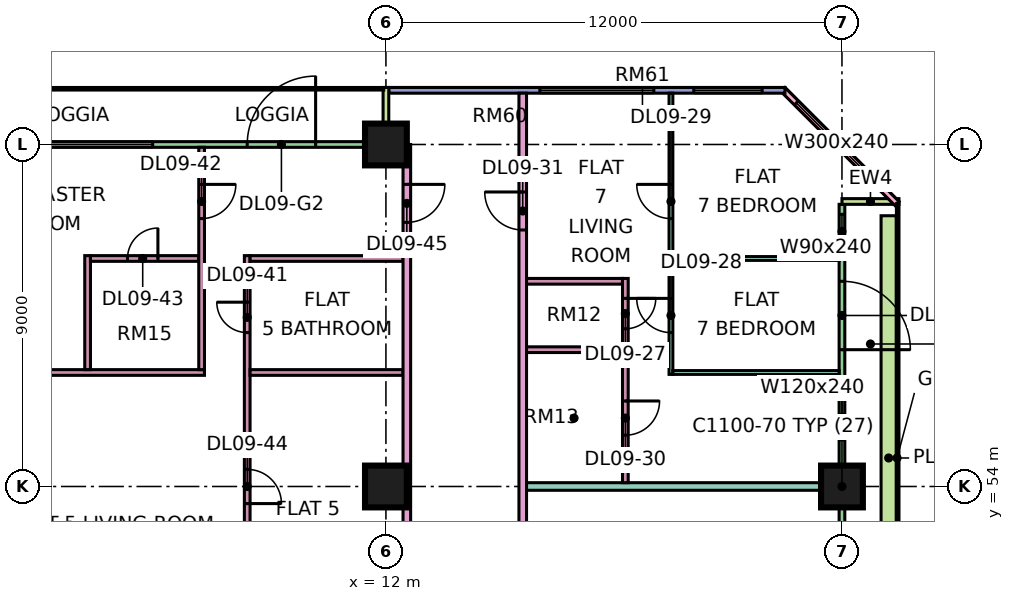
"""IFC4 building model, lengths in metres.
Left out: names, types, materials, properties, quantities, classifications, styles, units other than length and angle.
Written with IfcOpenShell. Run it as: python <this file> out.ifc"""

import sys

from ifc_helpers import new_model, si_unit, direction, frame, frame_2d, origin, origin_2d, place, context, subcontext, project, spatial, rectangle, extrude, element, fill, save


model = new_model("IFC4")
c1 = context("Model", 3, precision=1e-05, world=origin(), true_north=direction((0.0, 1.0)))
c2 = subcontext(c1, "Body", "Model", "MODEL_VIEW")
j1 = project(units=[si_unit("LENGTHUNIT", "METRE"), si_unit("PLANEANGLEUNIT", "RADIAN")], contexts=[c1])
p1 = place(None, origin())
s1 = spatial("IfcSite", under=j1, at=p1, CompositionType="ELEMENT")
p2 = place(p1, origin())
s2 = spatial("IfcBuilding", under=s1, at=p2, CompositionType="ELEMENT")
p3 = place(p2, frame((0.0, 0.0, 48.9)))
s3 = spatial("IfcBuildingStorey", under=s2, at=p3, CompositionType="ELEMENT", Elevation=48.9)
for number, where, z_axis, x_axis in (
    (1, (12.0, 54.0, 0.0), (0.0, 0.0, 1.0), (1.0, 0.0, 0.0)),
    (2, (12.0, 63.0, 0.0), (0.0, 0.0, 1.0), (1.0, 0.0, 0.0)),
    (3, (24.0, 54.0, 0.0), (0.0, 0.0, 1.0), (1.0, 0.0, 0.0)),
):
    element("IfcColumn", number, at=place(p3, frame(where, z_axis=z_axis, x_axis=x_axis)), inside=s3, PredefinedType="COLUMN", context=c2, shape_type="SweptSolid", body=[
        extrude(rectangle(XDim=1.1, YDim=1.1, at=origin_2d()), origin(), (0.0, 0.0, 1.0), 3.75),
    ])
p4 = place(p3, frame((24.0, 48.075, 0.0), z_axis=(0.0, 0.0, 1.0), x_axis=(0.0, 1.0, 0.0)))
e4 = element("IfcWall", 4, at=p4, inside=s3, PredefinedType="SOLIDWALL", context=c2, shape_type="SweptSolid", body=[
    extrude(rectangle(XDim=13.35, YDim=0.15, at=frame_2d((6.675, 0.0))), origin(), (0.0, 0.0, 1.0), 3.35),
])
p5 = place(p4, frame((0.538, 0.0, 0.45)))
e5 = element("IfcOpeningElement", 5, at=p5, cuts=e4, PredefinedType="OPENING", context=c2, shape_type="SweptSolid", body=[
    extrude(rectangle(XDim=4.2, YDim=2.4, at=frame_2d((2.1, 1.2))), frame((0.0, 0.085, 0.0), z_axis=(0.0, -1.0, 0.0), x_axis=(1.0, 0.0, 0.0)), (0.0, 0.0, 1.0), 0.17),
])
p6 = place(p4, frame((7.15, 0.0, 0.45)))
e6 = element("IfcOpeningElement", 6, at=p6, cuts=e4, PredefinedType="OPENING", context=c2, shape_type="SweptSolid", body=[
    extrude(rectangle(XDim=1.2, YDim=2.4, at=frame_2d((0.6, 1.2))), frame((0.0, 0.085, 0.0), z_axis=(0.0, -1.0, 0.0), x_axis=(1.0, 0.0, 0.0)), (0.0, 0.0, 1.0), 0.17),
])
p7 = place(p4, frame((9.525, 0.0, 0.0)))
e7 = element("IfcOpeningElement", 7, at=p7, cuts=e4, PredefinedType="OPENING", context=c2, shape_type="SweptSolid", body=[
    extrude(rectangle(XDim=1.8, YDim=2.4, at=frame_2d((0.9, 1.2))), frame((0.0, 0.085, 0.0), z_axis=(0.0, -1.0, 0.0), x_axis=(1.0, 0.0, 0.0)), (0.0, 0.0, 1.0), 0.17),
])
p8 = place(p4, frame((12.188, 0.0, 0.45)))
e8 = element("IfcOpeningElement", 8, at=p8, cuts=e4, PredefinedType="OPENING", context=c2, shape_type="SweptSolid", body=[
    extrude(rectangle(XDim=0.9, YDim=2.4, at=frame_2d((0.45, 1.2))), frame((0.0, 0.085, 0.0), z_axis=(0.0, -1.0, 0.0), x_axis=(1.0, 0.0, 0.0)), (0.0, 0.0, 1.0), 0.17),
])
p9 = place(p3, frame((25.5, 61.5, 0.0), z_axis=(0.0, 0.0, 1.0), x_axis=(-1.0, 0.0, 0.0)))
e9 = element("IfcWall", 9, at=p9, inside=s3, PredefinedType="SOLIDWALL", context=c2, shape_type="SweptSolid", body=[
    extrude(rectangle(XDim=1.5, YDim=0.15, at=frame_2d((0.75, 0.0))), origin(), (0.0, 0.0, 1.0), 3.35),
])
p10 = place(p3, frame((25.447, 61.447, 0.0), z_axis=(0.0, 0.0, 1.0), x_axis=(-0.707106781187, 0.707106781187, 0.0)))
e10 = element("IfcWall", 10, at=p10, inside=s3, PredefinedType="SOLIDWALL", context=c2, shape_type="SweptSolid", body=[
    extrude(rectangle(XDim=4.243, YDim=0.15, at=frame_2d((2.121, 0.0))), origin(), (0.0, 0.0, 1.0), 3.35),
])
p11 = place(p10, frame((0.744, 0.0, 0.45)))
e11 = element("IfcOpeningElement", 11, at=p11, cuts=e10, PredefinedType="OPENING", context=c2, shape_type="SweptSolid", body=[
    extrude(rectangle(XDim=3.0, YDim=2.4, at=frame_2d((1.5, 1.2))), frame((0.0, 0.085, 0.0), z_axis=(0.0, -1.0, 0.0), x_axis=(1.0, 0.0, 0.0)), (0.0, 0.0, 1.0), 0.17),
])
p12 = place(p3, frame((22.5, 64.425, 0.0), z_axis=(0.0, 0.0, 1.0), x_axis=(-1.0, 0.0, 0.0)))
e12 = element("IfcWall", 12, at=p12, inside=s3, PredefinedType="SOLIDWALL", context=c2, shape_type="SweptSolid", body=[
    extrude(rectangle(XDim=10.425, YDim=0.15, at=frame_2d((5.212, 0.0))), origin(), (0.0, 0.0, 1.0), 3.35),
])
p13 = place(p12, frame((0.6, 0.0, 0.45)))
e13 = element("IfcOpeningElement", 13, at=p13, cuts=e12, PredefinedType="OPENING", context=c2, shape_type="SweptSolid", body=[
    extrude(rectangle(XDim=1.8, YDim=2.4, at=frame_2d((0.9, 1.2))), frame((0.0, 0.085, 0.0), z_axis=(0.0, -1.0, 0.0), x_axis=(1.0, 0.0, 0.0)), (0.0, 0.0, 1.0), 0.17),
])
p14 = place(p12, frame((3.45, 0.0, 0.45)))
e14 = element("IfcOpeningElement", 14, at=p14, cuts=e12, PredefinedType="OPENING", context=c2, shape_type="SweptSolid", body=[
    extrude(rectangle(XDim=3.0, YDim=2.4, at=frame_2d((1.5, 1.2))), frame((0.0, 0.085, 0.0), z_axis=(0.0, -1.0, 0.0), x_axis=(1.0, 0.0, 0.0)), (0.0, 0.0, 1.0), 0.17),
])
p15 = place(p3, frame((11.925, 63.0, 0.0), z_axis=(0.0, 0.0, 1.0), x_axis=(-1.0, 0.0, 0.0)))
e15 = element("IfcWall", 15, at=p15, inside=s3, PredefinedType="SOLIDWALL", context=c2, shape_type="SweptSolid", body=[
    extrude(rectangle(XDim=10.35, YDim=0.15, at=frame_2d((5.175, 0.0))), origin(), (0.0, 0.0, 1.0), 3.35),
])
p16 = place(p15, frame((1.775, 0.0, 0.0)))
e16 = element("IfcOpeningElement", 16, at=p16, cuts=e15, PredefinedType="OPENING", context=c2, shape_type="SweptSolid", body=[
    extrude(rectangle(XDim=1.8, YDim=2.4, at=frame_2d((0.9, 1.2))), frame((0.0, 0.085, 0.0), z_axis=(0.0, -1.0, 0.0), x_axis=(1.0, 0.0, 0.0)), (0.0, 0.0, 1.0), 0.17),
])
p17 = place(p15, frame((6.062, 0.0, 0.45)))
e17 = element("IfcOpeningElement", 17, at=p17, cuts=e15, PredefinedType="OPENING", context=c2, shape_type="SweptSolid", body=[
    extrude(rectangle(XDim=3.0, YDim=2.4, at=frame_2d((1.5, 1.2))), frame((0.0, 0.085, 0.0), z_axis=(0.0, -1.0, 0.0), x_axis=(1.0, 0.0, 0.0)), (0.0, 0.0, 1.0), 0.17),
])
p18 = place(p3, frame((12.0, 64.5, 0.0), z_axis=(0.0, 0.0, 1.0), x_axis=(0.0, -1.0, 0.0)))
e18 = element("IfcWall", 18, at=p18, inside=s3, PredefinedType="SOLIDWALL", context=c2, shape_type="SweptSolid", body=[
    extrude(rectangle(XDim=1.5, YDim=0.15, at=frame_2d((0.75, 0.0))), origin(), (0.0, 0.0, 1.0), 3.35),
])
p19 = place(p3, frame((25.229, 48.375, 0.0), z_axis=(0.0, 0.0, 1.0), x_axis=(0.0, 1.0, 0.0)))
e19 = element("IfcWall", 19, at=p19, inside=s3, PredefinedType="SOLIDWALL", context=c2, shape_type="SweptSolid", body=[
    extrude(rectangle(XDim=12.75, YDim=0.4, at=frame_2d((6.375, 0.0))), origin(), (0.0, 0.0, 1.0), 0.7),
])
p20 = place(p3, frame((0.074, 57.0, 0.0), z_axis=(0.0, 0.0, 1.0), x_axis=(1.0, 0.0, 0.0)))
e20 = element("IfcWall", 20, at=p20, inside=s3, PredefinedType="PARTITIONING", context=c2, shape_type="SweptSolid", body=[
    extrude(rectangle(XDim=7.151, YDim=0.15, at=frame_2d((3.576, 0.0))), origin(), (0.0, 0.0, 1.0), 3.35),
])
p21 = place(p3, frame((4.15, 57.075, 0.0), z_axis=(0.0, 0.0, 1.0), x_axis=(0.0, 1.0, 0.0)))
e21 = element("IfcWall", 21, at=p21, inside=s3, PredefinedType="PARTITIONING", context=c2, shape_type="SweptSolid", body=[
    extrude(rectangle(XDim=3.0, YDim=0.15, at=frame_2d((1.5, 0.0))), origin(), (0.0, 0.0, 1.0), 3.35),
])
p22 = place(p3, frame((4.225, 60.0, 0.0), z_axis=(0.0, 0.0, 1.0), x_axis=(1.0, 0.0, 0.0)))
e22 = element("IfcWall", 22, at=p22, inside=s3, PredefinedType="PARTITIONING", context=c2, shape_type="SweptSolid", body=[
    extrude(rectangle(XDim=2.85, YDim=0.15, at=frame_2d((1.425, 0.0))), origin(), (0.0, 0.0, 1.0), 3.35),
])
p23 = place(p22, frame((0.975, 0.0, 0.0)))
e23 = element("IfcOpeningElement", 23, at=p23, cuts=e22, PredefinedType="OPENING", context=c2, shape_type="SweptSolid", body=[
    extrude(rectangle(XDim=0.8, YDim=2.1, at=frame_2d((0.4, 1.05))), frame((0.0, 0.085, 0.0), z_axis=(0.0, -1.0, 0.0), x_axis=(1.0, 0.0, 0.0)), (0.0, 0.0, 1.0), 0.17),
])
p24 = place(p3, frame((7.15, 57.075, 0.0), z_axis=(0.0, 0.0, 1.0), x_axis=(0.0, 1.0, 0.0)))
e24 = element("IfcWall", 24, at=p24, inside=s3, PredefinedType="PARTITIONING", context=c2, shape_type="SweptSolid", body=[
    extrude(rectangle(XDim=5.851, YDim=0.15, at=frame_2d((2.926, 0.0))), origin(), (0.0, 0.0, 1.0), 3.35),
])
p25 = place(p24, frame((3.975, 0.0, 0.0)))
e25 = element("IfcOpeningElement", 25, at=p25, cuts=e24, PredefinedType="OPENING", context=c2, shape_type="SweptSolid", body=[
    extrude(rectangle(XDim=0.9, YDim=2.1, at=frame_2d((0.45, 1.05))), frame((0.0, 0.085, 0.0), z_axis=(0.0, -1.0, 0.0), x_axis=(1.0, 0.0, 0.0)), (0.0, 0.0, 1.0), 0.17),
])
p26 = place(p3, frame((8.35, 51.1, 0.0), z_axis=(0.0, 0.0, 1.0), x_axis=(0.0, 1.0, 0.0)))
e26 = element("IfcWall", 26, at=p26, inside=s3, PredefinedType="PARTITIONING", context=c2, shape_type="SweptSolid", body=[
    extrude(rectangle(XDim=8.975, YDim=0.15, at=frame_2d((4.487, 0.0))), origin(), (0.0, 0.0, 1.0), 3.35),
])
p27 = place(p26, frame((6.95, 0.0, 0.0)))
e27 = element("IfcOpeningElement", 27, at=p27, cuts=e26, PredefinedType="OPENING", context=c2, shape_type="SweptSolid", body=[
    extrude(rectangle(XDim=0.8, YDim=2.1, at=frame_2d((0.4, 1.05))), frame((0.0, 0.085, 0.0), z_axis=(0.0, -1.0, 0.0), x_axis=(1.0, 0.0, 0.0)), (0.0, 0.0, 1.0), 0.17),
])
p28 = place(p26, frame((2.45, 0.0, 0.0)))
e28 = element("IfcOpeningElement", 28, at=p28, cuts=e26, PredefinedType="OPENING", context=c2, shape_type="SweptSolid", body=[
    extrude(rectangle(XDim=0.9, YDim=2.1, at=frame_2d((0.45, 1.05))), frame((0.0, 0.085, 0.0), z_axis=(0.0, -1.0, 0.0), x_axis=(1.0, 0.0, 0.0)), (0.0, 0.0, 1.0), 0.17),
])
for number, where, z_axis, x_axis in (
    (29, (8.425, 57.0, 0.0), (0.0, 0.0, 1.0), (1.0, 0.0, 0.0)),
    (30, (8.425, 60.0, 0.0), (0.0, 0.0, 1.0), (1.0, 0.0, 0.0)),
):
    element("IfcWall", number, at=place(p3, frame(where, z_axis=z_axis, x_axis=x_axis)), inside=s3, PredefinedType="PARTITIONING", context=c2, shape_type="SweptSolid", body=[
        extrude(rectangle(XDim=4.025, YDim=0.15, at=frame_2d((2.012, 0.0))), origin(), (0.0, 0.0, 1.0), 3.35),
    ])
p29 = place(p3, frame((12.55, 39.225, 0.0), z_axis=(0.0, 0.0, 1.0), x_axis=(0.0, 1.0, 0.0)))
e31 = element("IfcWall", 31, at=p29, inside=s3, PredefinedType="PARTITIONING", context=c2, shape_type="SweptSolid", body=[
    extrude(rectangle(XDim=23.775, YDim=0.2, at=frame_2d((11.887, 0.0))), origin(), (0.0, 0.0, 1.0), 3.35),
])
p30 = place(p29, frame((3.725, 0.0, 0.0)))
e32 = element("IfcOpeningElement", 32, at=p30, cuts=e31, PredefinedType="OPENING", context=c2, shape_type="SweptSolid", body=[
    extrude(rectangle(XDim=1.0, YDim=2.1, at=frame_2d((0.5, 1.05))), frame((0.0, 0.11, 0.0), z_axis=(0.0, -1.0, 0.0), x_axis=(1.0, 0.0, 0.0)), (0.0, 0.0, 1.0), 0.22),
])
p31 = place(p29, frame((21.725, 0.0, 0.0)))
e33 = element("IfcOpeningElement", 33, at=p31, cuts=e31, PredefinedType="OPENING", context=c2, shape_type="SweptSolid", body=[
    extrude(rectangle(XDim=1.0, YDim=2.1, at=frame_2d((0.5, 1.05))), frame((0.0, 0.11, 0.0), z_axis=(0.0, -1.0, 0.0), x_axis=(1.0, 0.0, 0.0)), (0.0, 0.0, 1.0), 0.22),
])
p32 = place(p3, frame((15.6, 51.225, 0.0), z_axis=(0.0, 0.0, 1.0), x_axis=(0.0, 1.0, 0.0)))
e34 = element("IfcWall", 34, at=p32, inside=s3, PredefinedType="PARTITIONING", context=c2, shape_type="SweptSolid", body=[
    extrude(rectangle(XDim=13.125, YDim=0.2, at=frame_2d((6.562, 0.0))), origin(), (0.0, 0.0, 1.0), 3.35),
])
p33 = place(p32, frame((9.525, 0.0, 0.0)))
e35 = element("IfcOpeningElement", 35, at=p33, cuts=e34, PredefinedType="OPENING", context=c2, shape_type="SweptSolid", body=[
    extrude(rectangle(XDim=1.0, YDim=2.1, at=frame_2d((0.5, 1.05))), frame((0.0, 0.11, 0.0), z_axis=(0.0, -1.0, 0.0), x_axis=(1.0, 0.0, 0.0)), (0.0, 0.0, 1.0), 0.22),
])
p34 = place(p3, frame((15.7, 54.0, 0.0), z_axis=(0.0, 0.0, 1.0), x_axis=(1.0, 0.0, 0.0)))
e36 = element("IfcWall", 36, at=p34, inside=s3, PredefinedType="PARTITIONING", context=c2, shape_type="SweptSolid", body=[
    extrude(rectangle(XDim=8.226, YDim=0.2, at=frame_2d((4.113, 0.0))), origin(), (0.0, 0.0, 1.0), 3.35),
])
for number, where, z_axis, x_axis in (
    (37, (15.7, 57.6, 0.0), (0.0, 0.0, 1.0), (1.0, 0.0, 0.0)),
    (38, (15.7, 59.4, 0.0), (0.0, 0.0, 1.0), (1.0, 0.0, 0.0)),
):
    element("IfcWall", number, at=place(p3, frame(where, z_axis=z_axis, x_axis=x_axis)), inside=s3, PredefinedType="PARTITIONING", context=c2, shape_type="SweptSolid", body=[
        extrude(rectangle(XDim=2.525, YDim=0.15, at=frame_2d((1.263, 0.0))), origin(), (0.0, 0.0, 1.0), 3.35),
    ])
p35 = place(p3, frame((18.3, 54.1, 0.0), z_axis=(0.0, 0.0, 1.0), x_axis=(0.0, 1.0, 0.0)))
e39 = element("IfcWall", 39, at=p35, inside=s3, PredefinedType="PARTITIONING", context=c2, shape_type="SweptSolid", body=[
    extrude(rectangle(XDim=5.375, YDim=0.15, at=frame_2d((2.688, 0.0))), origin(), (0.0, 0.0, 1.0), 3.35),
])
p36 = place(p35, frame((4.05, 0.0, 0.0)))
e40 = element("IfcOpeningElement", 40, at=p36, cuts=e39, PredefinedType="OPENING", context=c2, shape_type="SweptSolid", body=[
    extrude(rectangle(XDim=0.8, YDim=2.1, at=frame_2d((0.4, 1.05))), frame((0.0, 0.085, 0.0), z_axis=(0.0, -1.0, 0.0), x_axis=(1.0, 0.0, 0.0)), (0.0, 0.0, 1.0), 0.17),
])
p37 = place(p35, frame((1.25, 0.0, 0.0)))
e41 = element("IfcOpeningElement", 41, at=p37, cuts=e39, PredefinedType="OPENING", context=c2, shape_type="SweptSolid", body=[
    extrude(rectangle(XDim=0.9, YDim=2.1, at=frame_2d((0.45, 1.05))), frame((0.0, 0.085, 0.0), z_axis=(0.0, -1.0, 0.0), x_axis=(1.0, 0.0, 0.0)), (0.0, 0.0, 1.0), 0.17),
])
p38 = place(p3, frame((19.5, 56.95, 0.0), z_axis=(0.0, 0.0, 1.0), x_axis=(0.0, 1.0, 0.0)))
e42 = element("IfcWall", 42, at=p38, inside=s3, PredefinedType="PARTITIONING", context=c2, shape_type="SweptSolid", body=[
    extrude(rectangle(XDim=7.4, YDim=0.1, at=frame_2d((3.7, 0.0))), origin(), (0.0, 0.0, 1.0), 3.35),
])
p39 = place(p38, frame((1.1, 0.0, 0.0)))
e43 = element("IfcOpeningElement", 43, at=p39, cuts=e42, PredefinedType="OPENING", context=c2, shape_type="SweptSolid", body=[
    extrude(rectangle(XDim=0.9, YDim=2.1, at=frame_2d((0.45, 1.05))), frame((0.0, 0.06, 0.0), z_axis=(0.0, -1.0, 0.0), x_axis=(1.0, 0.0, 0.0)), (0.0, 0.0, 1.0), 0.12),
])
p40 = place(p38, frame((4.1, 0.0, 0.0)))
e44 = element("IfcOpeningElement", 44, at=p40, cuts=e42, PredefinedType="OPENING", context=c2, shape_type="SweptSolid", body=[
    extrude(rectangle(XDim=0.9, YDim=2.1, at=frame_2d((0.45, 1.05))), frame((0.0, 0.06, 0.0), z_axis=(0.0, -1.0, 0.0), x_axis=(1.0, 0.0, 0.0)), (0.0, 0.0, 1.0), 0.12),
])
for number, where, z_axis, x_axis in (
    (45, (19.55, 57.0, 0.0), (0.0, 0.0, 1.0), (1.0, 0.0, 0.0)),
    (46, (19.55, 60.0, 0.0), (0.0, 0.0, 1.0), (1.0, 0.0, 0.0)),
):
    element("IfcWall", number, at=place(p3, frame(where, z_axis=z_axis, x_axis=x_axis)), inside=s3, PredefinedType="PARTITIONING", context=c2, shape_type="SweptSolid", body=[
        extrude(rectangle(XDim=4.376, YDim=0.1, at=frame_2d((2.188, 0.0))), origin(), (0.0, 0.0, 1.0), 3.35),
    ])
p41 = place(p6, origin())
e47 = element("IfcWindow", 47, at=p41, inside=s3, PartitioningType="SINGLE_PANEL", PredefinedType="WINDOW", context=c2, shape_type="SweptSolid", body=[
    extrude(rectangle(XDim=1.2, YDim=2.4, at=frame_2d((0.6, 1.2))), frame((0.0, 0.03, 0.0), z_axis=(0.0, -1.0, 0.0), x_axis=(1.0, 0.0, 0.0)), (0.0, 0.0, 1.0), 0.06),
])
fill(e6, e47)
p42 = place(p7, frame((1.8, 0.0, 0.0), z_axis=(0.0, 0.0, 1.0), x_axis=(-1.0, 0.0, 0.0)))
e48 = element("IfcDoor", 48, at=p42, inside=s3, OperationType="DOUBLE_DOOR_SINGLE_SWING", PredefinedType="DOOR", context=c2, shape_type="SweptSolid", body=[
    extrude(rectangle(XDim=1.8, YDim=2.4, at=frame_2d((0.9, 1.2))), frame((0.0, 0.025, 0.0), z_axis=(0.0, -1.0, 0.0), x_axis=(1.0, 0.0, 0.0)), (0.0, 0.0, 1.0), 0.05),
])
fill(e7, e48)
p43 = place(p8, origin())
e49 = element("IfcWindow", 49, at=p43, inside=s3, PartitioningType="SINGLE_PANEL", PredefinedType="WINDOW", context=c2, shape_type="SweptSolid", body=[
    extrude(rectangle(XDim=0.9, YDim=2.4, at=frame_2d((0.45, 1.2))), frame((0.0, 0.03, 0.0), z_axis=(0.0, -1.0, 0.0), x_axis=(1.0, 0.0, 0.0)), (0.0, 0.0, 1.0), 0.06),
])
fill(e8, e49)
p44 = place(p11, origin())
e50 = element("IfcWindow", 50, at=p44, inside=s3, PartitioningType="SINGLE_PANEL", PredefinedType="WINDOW", context=c2, shape_type="SweptSolid", body=[
    extrude(rectangle(XDim=3.0, YDim=2.4, at=frame_2d((1.5, 1.2))), frame((0.0, 0.03, 0.0), z_axis=(0.0, -1.0, 0.0), x_axis=(1.0, 0.0, 0.0)), (0.0, 0.0, 1.0), 0.06),
])
fill(e11, e50)
p45 = place(p13, origin())
e51 = element("IfcWindow", 51, at=p45, inside=s3, PartitioningType="SINGLE_PANEL", PredefinedType="WINDOW", context=c2, shape_type="SweptSolid", body=[
    extrude(rectangle(XDim=1.8, YDim=2.4, at=frame_2d((0.9, 1.2))), frame((0.0, 0.03, 0.0), z_axis=(0.0, -1.0, 0.0), x_axis=(1.0, 0.0, 0.0)), (0.0, 0.0, 1.0), 0.06),
])
fill(e13, e51)
p46 = place(p14, origin())
e52 = element("IfcWindow", 52, at=p46, inside=s3, PartitioningType="SINGLE_PANEL", PredefinedType="WINDOW", context=c2, shape_type="SweptSolid", body=[
    extrude(rectangle(XDim=3.0, YDim=2.4, at=frame_2d((1.5, 1.2))), frame((0.0, 0.03, 0.0), z_axis=(0.0, -1.0, 0.0), x_axis=(1.0, 0.0, 0.0)), (0.0, 0.0, 1.0), 0.06),
])
fill(e14, e52)
p47 = place(p16, frame((1.8, 0.0, 0.0), z_axis=(0.0, 0.0, 1.0), x_axis=(-1.0, 0.0, 0.0)))
e53 = element("IfcDoor", 53, at=p47, inside=s3, OperationType="DOUBLE_DOOR_SINGLE_SWING", PredefinedType="DOOR", context=c2, shape_type="SweptSolid", body=[
    extrude(rectangle(XDim=1.8, YDim=2.4, at=frame_2d((0.9, 1.2))), frame((0.0, 0.025, 0.0), z_axis=(0.0, -1.0, 0.0), x_axis=(1.0, 0.0, 0.0)), (0.0, 0.0, 1.0), 0.05),
])
fill(e16, e53)
p48 = place(p17, origin())
e54 = element("IfcWindow", 54, at=p48, inside=s3, PartitioningType="SINGLE_PANEL", PredefinedType="WINDOW", context=c2, shape_type="SweptSolid", body=[
    extrude(rectangle(XDim=3.0, YDim=2.4, at=frame_2d((1.5, 1.2))), frame((0.0, 0.03, 0.0), z_axis=(0.0, -1.0, 0.0), x_axis=(1.0, 0.0, 0.0)), (0.0, 0.0, 1.0), 0.06),
])
fill(e17, e54)
p49 = place(p36, origin())
e55 = element("IfcDoor", 55, at=p49, inside=s3, OperationType="SINGLE_SWING_RIGHT", PredefinedType="DOOR", context=c2, shape_type="SweptSolid", body=[
    extrude(rectangle(XDim=0.8, YDim=2.1, at=frame_2d((0.4, 1.05))), frame((0.0, 0.025, 0.0), z_axis=(0.0, -1.0, 0.0), x_axis=(1.0, 0.0, 0.0)), (0.0, 0.0, 1.0), 0.05),
])
fill(e40, e55)
p50 = place(p39, frame((0.9, 0.0, 0.0), z_axis=(0.0, 0.0, 1.0), x_axis=(-1.0, 0.0, 0.0)))
e56 = element("IfcDoor", 56, at=p50, inside=s3, OperationType="SINGLE_SWING_RIGHT", PredefinedType="DOOR", context=c2, shape_type="SweptSolid", body=[
    extrude(rectangle(XDim=0.9, YDim=2.1, at=frame_2d((0.45, 1.05))), frame((0.0, 0.025, 0.0), z_axis=(0.0, -1.0, 0.0), x_axis=(1.0, 0.0, 0.0)), (0.0, 0.0, 1.0), 0.05),
])
fill(e43, e56)
p51 = place(p40, frame((0.9, 0.0, 0.0), z_axis=(0.0, 0.0, 1.0), x_axis=(-1.0, 0.0, 0.0)))
e57 = element("IfcDoor", 57, at=p51, inside=s3, OperationType="SINGLE_SWING_RIGHT", PredefinedType="DOOR", context=c2, shape_type="SweptSolid", body=[
    extrude(rectangle(XDim=0.9, YDim=2.1, at=frame_2d((0.45, 1.05))), frame((0.0, 0.025, 0.0), z_axis=(0.0, -1.0, 0.0), x_axis=(1.0, 0.0, 0.0)), (0.0, 0.0, 1.0), 0.05),
])
fill(e44, e57)
p52 = place(p37, origin())
e58 = element("IfcDoor", 58, at=p52, inside=s3, OperationType="SINGLE_SWING_RIGHT", PredefinedType="DOOR", context=c2, shape_type="SweptSolid", body=[
    extrude(rectangle(XDim=0.9, YDim=2.1, at=frame_2d((0.45, 1.05))), frame((0.0, 0.025, 0.0), z_axis=(0.0, -1.0, 0.0), x_axis=(1.0, 0.0, 0.0)), (0.0, 0.0, 1.0), 0.05),
])
fill(e41, e58)
p53 = place(p33, frame((1.0, 0.0, 0.0), z_axis=(0.0, 0.0, 1.0), x_axis=(-1.0, 0.0, 0.0)))
e59 = element("IfcDoor", 59, at=p53, inside=s3, OperationType="SINGLE_SWING_RIGHT", PredefinedType="DOOR", context=c2, shape_type="SweptSolid", body=[
    extrude(rectangle(XDim=1.0, YDim=2.1, at=frame_2d((0.5, 1.05))), frame((0.0, 0.025, 0.0), z_axis=(0.0, -1.0, 0.0), x_axis=(1.0, 0.0, 0.0)), (0.0, 0.0, 1.0), 0.05),
])
fill(e35, e59)
p54 = place(p27, frame((0.8, 0.0, 0.0), z_axis=(0.0, 0.0, 1.0), x_axis=(-1.0, 0.0, 0.0)))
e60 = element("IfcDoor", 60, at=p54, inside=s3, OperationType="SINGLE_SWING_RIGHT", PredefinedType="DOOR", context=c2, shape_type="SweptSolid", body=[
    extrude(rectangle(XDim=0.8, YDim=2.1, at=frame_2d((0.4, 1.05))), frame((0.0, 0.025, 0.0), z_axis=(0.0, -1.0, 0.0), x_axis=(1.0, 0.0, 0.0)), (0.0, 0.0, 1.0), 0.05),
])
fill(e27, e60)
p55 = place(p25, origin())
e61 = element("IfcDoor", 61, at=p55, inside=s3, OperationType="SINGLE_SWING_RIGHT", PredefinedType="DOOR", context=c2, shape_type="SweptSolid", body=[
    extrude(rectangle(XDim=0.9, YDim=2.1, at=frame_2d((0.45, 1.05))), frame((0.0, 0.025, 0.0), z_axis=(0.0, -1.0, 0.0), x_axis=(1.0, 0.0, 0.0)), (0.0, 0.0, 1.0), 0.05),
])
fill(e25, e61)
p56 = place(p23, frame((0.8, 0.0, 0.0), z_axis=(0.0, 0.0, 1.0), x_axis=(-1.0, 0.0, 0.0)))
e62 = element("IfcDoor", 62, at=p56, inside=s3, OperationType="SINGLE_SWING_RIGHT", PredefinedType="DOOR", context=c2, shape_type="SweptSolid", body=[
    extrude(rectangle(XDim=0.8, YDim=2.1, at=frame_2d((0.4, 1.05))), frame((0.0, 0.025, 0.0), z_axis=(0.0, -1.0, 0.0), x_axis=(1.0, 0.0, 0.0)), (0.0, 0.0, 1.0), 0.05),
])
fill(e23, e62)
p57 = place(p28, frame((0.9, 0.0, 0.0), z_axis=(0.0, 0.0, 1.0), x_axis=(-1.0, 0.0, 0.0)))
e63 = element("IfcDoor", 63, at=p57, inside=s3, OperationType="SINGLE_SWING_LEFT", PredefinedType="DOOR", context=c2, shape_type="SweptSolid", body=[
    extrude(rectangle(XDim=0.9, YDim=2.1, at=frame_2d((0.45, 1.05))), frame((0.0, 0.025, 0.0), z_axis=(0.0, -1.0, 0.0), x_axis=(1.0, 0.0, 0.0)), (0.0, 0.0, 1.0), 0.05),
])
fill(e28, e63)
p58 = place(p31, origin())
e64 = element("IfcDoor", 64, at=p58, inside=s3, OperationType="SINGLE_SWING_RIGHT", PredefinedType="DOOR", context=c2, shape_type="SweptSolid", body=[
    extrude(rectangle(XDim=1.0, YDim=2.1, at=frame_2d((0.5, 1.05))), frame((0.0, 0.025, 0.0), z_axis=(0.0, -1.0, 0.0), x_axis=(1.0, 0.0, 0.0)), (0.0, 0.0, 1.0), 0.05),
])
fill(e33, e64)
save(model, sys.argv[1])
